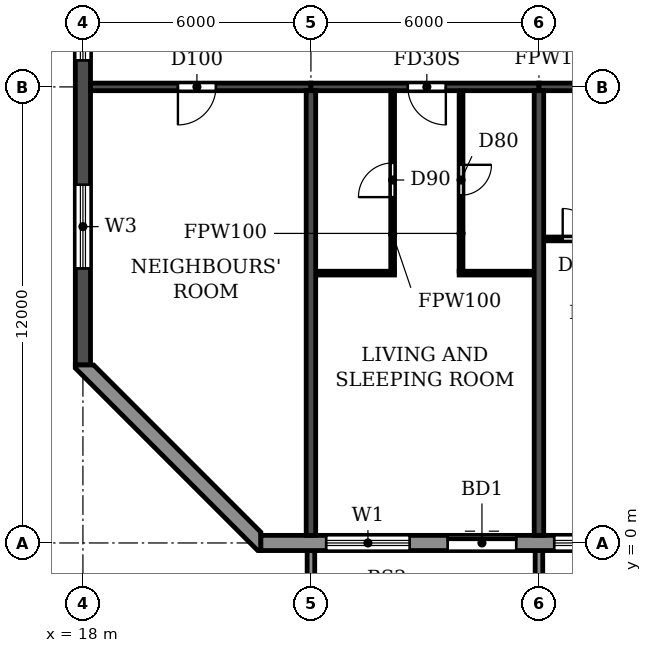
"""IFC4 building model, lengths in metres.
Left out: names, types, materials, properties, quantities, classifications, styles, units other than length and angle.
Written with IfcOpenShell. Run it as: python <this file> out.ifc"""

import sys

from ifc_helpers import new_model, si_unit, direction, frame, frame_2d, origin, place, context, subcontext, project, spatial, polyline, rectangle, outline, extrude, source, transform, mapped, element, fill, save


model = new_model("IFC4")
c1 = context("Model", 3, precision=1e-05, world=origin(), true_north=direction((0.0, 1.0)))
c2 = subcontext(c1, "Body", "Model", "MODEL_VIEW")
j1 = project(units=[si_unit("LENGTHUNIT", "METRE"), si_unit("PLANEANGLEUNIT", "RADIAN")], contexts=[c1])
p1 = place(None, origin())
s1 = spatial("IfcSite", under=j1, at=p1, CompositionType="ELEMENT")
p2 = place(p1, origin())
s2 = spatial("IfcBuilding", under=s1, at=p2, CompositionType="ELEMENT")
p3 = place(p2, frame((0.0, 0.0, 175.2)))
s3 = spatial("IfcBuildingStorey", under=s2, at=p3, CompositionType="ELEMENT", Elevation=175.2)
for number, where, z_axis, x_axis in (
    (1, (24.0, 0.2, 0.0), (0.0, 0.0, 1.0), (0.0, 1.0, 0.0)),
    (2, (30.0, 0.2, 0.0), (0.0, 0.0, 1.0), (0.0, 1.0, 0.0)),
):
    element("IfcWall", number, at=place(p3, frame(where, z_axis=z_axis, x_axis=x_axis)), inside=s3, PredefinedType="SHEAR", context=c2, shape_type="SweptSolid", body=[
        extrude(rectangle(XDim=11.7, YDim=0.25, at=frame_2d((5.85, 0.0))), origin(), (0.0, 0.0, 1.0), 3.08),
    ])
p4 = place(p3, frame((18.0, 4.683, 0.0), z_axis=(0.0, 0.0, 1.0), x_axis=(0.0, 1.0, 0.0)))
e3 = element("IfcWall", 3, at=p4, inside=s3, PredefinedType="SHEAR", context=c2, shape_type="SweptSolid", body=[
    extrude(rectangle(XDim=31.834, YDim=0.4, at=frame_2d((15.917, 0.0))), origin(), (0.0, 0.0, 1.0), 3.08),
])
p5 = place(p4, frame((23.817, 0.0, 0.9)))
e4 = element("IfcOpeningElement", 4, at=p5, cuts=e3, PredefinedType="OPENING", context=c2, shape_type="SweptSolid", body=[
    extrude(rectangle(XDim=1.2, YDim=1.5, at=frame_2d((0.6, 0.75))), frame((0.0, 0.21, 0.0), z_axis=(0.0, -1.0, 0.0), x_axis=(1.0, 0.0, 0.0)), (0.0, 0.0, 1.0), 0.42),
])
p6 = place(p4, frame((8.017, 0.0, 0.9)))
e5 = element("IfcOpeningElement", 5, at=p6, cuts=e3, PredefinedType="OPENING", context=c2, shape_type="SweptSolid", body=[
    extrude(rectangle(XDim=1.2, YDim=1.5, at=frame_2d((0.6, 0.75))), frame((0.0, 0.21, 0.0), z_axis=(0.0, -1.0, 0.0), x_axis=(1.0, 0.0, 0.0)), (0.0, 0.0, 1.0), 0.42),
])
p7 = place(p4, frame((27.694, 0.0, 0.6)))
e6 = element("IfcOpeningElement", 6, at=p7, cuts=e3, PredefinedType="OPENING", context=c2, shape_type="SweptSolid", body=[
    extrude(rectangle(XDim=2.2, YDim=1.8, at=frame_2d((1.1, 0.9))), frame((0.0, 0.21, 0.0), z_axis=(0.0, -1.0, 0.0), x_axis=(1.0, 0.0, 0.0)), (0.0, 0.0, 1.0), 0.42),
])
p8 = place(p4, frame((2.541, 0.0, 0.6)))
e7 = element("IfcOpeningElement", 7, at=p8, cuts=e3, PredefinedType="OPENING", context=c2, shape_type="SweptSolid", body=[
    extrude(rectangle(XDim=2.2, YDim=1.8, at=frame_2d((1.1, 0.9))), frame((0.0, 0.21, 0.0), z_axis=(0.0, -1.0, 0.0), x_axis=(1.0, 0.0, 0.0)), (0.0, 0.0, 1.0), 0.42),
])
p9 = place(p4, frame((15.917, 0.0, 0.9)))
e8 = element("IfcOpeningElement", 8, at=p9, cuts=e3, PredefinedType="OPENING", context=c2, shape_type="SweptSolid", body=[
    extrude(rectangle(XDim=1.2, YDim=1.5, at=frame_2d((0.6, 0.75))), frame((0.0, 0.21, 0.0), z_axis=(0.0, -1.0, 0.0), x_axis=(1.0, 0.0, 0.0)), (0.0, 0.0, 1.0), 0.42),
])
p10 = place(p3, frame((18.2, 12.0, 0.0), z_axis=(0.0, 0.0, 1.0), x_axis=(1.0, 0.0, 0.0)))
e9 = element("IfcWall", 9, at=p10, inside=s3, PredefinedType="SHEAR", context=c2, shape_type="SweptSolid", body=[
    extrude(rectangle(XDim=5.8, YDim=0.2, at=frame_2d((2.9, 0.0))), origin(), (0.0, 0.0, 1.0), 2.48),
])
p11 = place(p10, frame((2.3, 0.0, 0.0)))
e10 = element("IfcOpeningElement", 10, at=p11, cuts=e9, PredefinedType="OPENING", context=c2, shape_type="SweptSolid", body=[
    extrude(rectangle(XDim=1.0, YDim=2.1, at=frame_2d((0.5, 1.05))), frame((0.0, 0.11, 0.0), z_axis=(0.0, -1.0, 0.0), x_axis=(1.0, 0.0, 0.0)), (0.0, 0.0, 1.0), 0.22),
])
p12 = place(p3, frame((24.0, 12.0, 0.0), z_axis=(0.0, 0.0, 1.0), x_axis=(1.0, 0.0, 0.0)))
e11 = element("IfcWall", 11, at=p12, inside=s3, PredefinedType="SHEAR", context=c2, shape_type="SweptSolid", body=[
    extrude(rectangle(XDim=6.0, YDim=0.2, at=frame_2d((3.0, 0.0))), origin(), (0.0, 0.0, 1.0), 2.48),
])
p13 = place(p12, frame((2.55, 0.0, 0.0)))
e12 = element("IfcOpeningElement", 12, at=p13, cuts=e11, PredefinedType="OPENING", context=c2, shape_type="SweptSolid", body=[
    extrude(rectangle(XDim=1.0, YDim=2.1, at=frame_2d((0.5, 1.05))), frame((0.0, 0.11, 0.0), z_axis=(0.0, -1.0, 0.0), x_axis=(1.0, 0.0, 0.0)), (0.0, 0.0, 1.0), 0.22),
])
p14 = place(p3, frame((30.0, 12.0, 0.0), z_axis=(0.0, 0.0, 1.0), x_axis=(1.0, 0.0, 0.0)))
e13 = element("IfcWall", 13, at=p14, inside=s3, PredefinedType="SHEAR", context=c2, shape_type="SweptSolid", body=[
    extrude(rectangle(XDim=6.0, YDim=0.2, at=frame_2d((3.0, 0.0))), origin(), (0.0, 0.0, 1.0), 2.48),
])
p15 = place(p14, frame((2.45, 0.0, 0.0)))
e14 = element("IfcOpeningElement", 14, at=p15, cuts=e13, PredefinedType="OPENING", context=c2, shape_type="SweptSolid", body=[
    extrude(rectangle(XDim=1.0, YDim=2.1, at=frame_2d((0.5, 1.05))), frame((0.0, 0.11, 0.0), z_axis=(0.0, -1.0, 0.0), x_axis=(1.0, 0.0, 0.0)), (0.0, 0.0, 1.0), 0.22),
])
p16 = place(p3, frame((22.683, 0.0, 0.0), z_axis=(0.0, 0.0, 1.0), x_axis=(1.0, 0.0, 0.0)))
e15 = element("IfcWall", 15, at=p16, inside=s3, PredefinedType="STANDARD", context=c2, shape_type="SweptSolid", body=[
    extrude(rectangle(XDim=56.634, YDim=0.4, at=frame_2d((28.317, 0.0))), origin(), (0.0, 0.0, 1.0), 3.08),
])
p17 = place(p16, frame((1.717, 0.0, 0.9)))
e16 = element("IfcOpeningElement", 16, at=p17, cuts=e15, PredefinedType="OPENING", context=c2, shape_type="SweptSolid", body=[
    extrude(rectangle(XDim=2.2, YDim=1.5, at=frame_2d((1.1, 0.75))), frame((0.0, 0.21, 0.0), z_axis=(0.0, -1.0, 0.0), x_axis=(1.0, 0.0, 0.0)), (0.0, 0.0, 1.0), 0.42),
])
p18 = place(p16, frame((4.917, 0.0, 0.0)))
e17 = element("IfcOpeningElement", 17, at=p18, cuts=e15, PredefinedType="OPENING", context=c2, shape_type="SweptSolid", body=[
    extrude(rectangle(XDim=1.8, YDim=2.4, at=frame_2d((0.9, 1.2))), frame((0.0, 0.21, 0.0), z_axis=(0.0, -1.0, 0.0), x_axis=(1.0, 0.0, 0.0)), (0.0, 0.0, 1.0), 0.42),
])
p19 = place(p16, frame((7.717, 0.0, 0.9)))
e18 = element("IfcOpeningElement", 18, at=p19, cuts=e15, PredefinedType="OPENING", context=c2, shape_type="SweptSolid", body=[
    extrude(rectangle(XDim=2.2, YDim=1.5, at=frame_2d((1.1, 0.75))), frame((0.0, 0.21, 0.0), z_axis=(0.0, -1.0, 0.0), x_axis=(1.0, 0.0, 0.0)), (0.0, 0.0, 1.0), 0.42),
])
p20 = place(p16, frame((10.717, 0.0, 0.9)))
e19 = element("IfcOpeningElement", 19, at=p20, cuts=e15, PredefinedType="OPENING", context=c2, shape_type="SweptSolid", body=[
    extrude(rectangle(XDim=2.2, YDim=1.5, at=frame_2d((1.1, 0.75))), frame((0.0, 0.21, 0.0), z_axis=(0.0, -1.0, 0.0), x_axis=(1.0, 0.0, 0.0)), (0.0, 0.0, 1.0), 0.42),
])
p21 = place(p16, frame((13.717, 0.0, 0.9)))
e20 = element("IfcOpeningElement", 20, at=p21, cuts=e15, PredefinedType="OPENING", context=c2, shape_type="SweptSolid", body=[
    extrude(rectangle(XDim=2.2, YDim=1.5, at=frame_2d((1.1, 0.75))), frame((0.0, 0.21, 0.0), z_axis=(0.0, -1.0, 0.0), x_axis=(1.0, 0.0, 0.0)), (0.0, 0.0, 1.0), 0.42),
])
p22 = place(p16, frame((16.917, 0.0, 0.0)))
e21 = element("IfcOpeningElement", 21, at=p22, cuts=e15, PredefinedType="OPENING", context=c2, shape_type="SweptSolid", body=[
    extrude(rectangle(XDim=1.8, YDim=2.4, at=frame_2d((0.9, 1.2))), frame((0.0, 0.21, 0.0), z_axis=(0.0, -1.0, 0.0), x_axis=(1.0, 0.0, 0.0)), (0.0, 0.0, 1.0), 0.42),
])
p23 = place(p16, frame((19.717, 0.0, 0.9)))
e22 = element("IfcOpeningElement", 22, at=p23, cuts=e15, PredefinedType="OPENING", context=c2, shape_type="SweptSolid", body=[
    extrude(rectangle(XDim=2.2, YDim=1.5, at=frame_2d((1.1, 0.75))), frame((0.0, 0.21, 0.0), z_axis=(0.0, -1.0, 0.0), x_axis=(1.0, 0.0, 0.0)), (0.0, 0.0, 1.0), 0.42),
])
p24 = place(p16, frame((22.717, 0.0, 0.9)))
e23 = element("IfcOpeningElement", 23, at=p24, cuts=e15, PredefinedType="OPENING", context=c2, shape_type="SweptSolid", body=[
    extrude(rectangle(XDim=2.2, YDim=1.5, at=frame_2d((1.1, 0.75))), frame((0.0, 0.21, 0.0), z_axis=(0.0, -1.0, 0.0), x_axis=(1.0, 0.0, 0.0)), (0.0, 0.0, 1.0), 0.42),
])
p25 = place(p16, frame((25.917, 0.0, 0.0)))
e24 = element("IfcOpeningElement", 24, at=p25, cuts=e15, PredefinedType="OPENING", context=c2, shape_type="SweptSolid", body=[
    extrude(rectangle(XDim=1.8, YDim=2.4, at=frame_2d((0.9, 1.2))), frame((0.0, 0.21, 0.0), z_axis=(0.0, -1.0, 0.0), x_axis=(1.0, 0.0, 0.0)), (0.0, 0.0, 1.0), 0.42),
])
p26 = place(p16, frame((28.717, 0.0, 0.9)))
e25 = element("IfcOpeningElement", 25, at=p26, cuts=e15, PredefinedType="OPENING", context=c2, shape_type="SweptSolid", body=[
    extrude(rectangle(XDim=2.2, YDim=1.5, at=frame_2d((1.1, 0.75))), frame((0.0, 0.21, 0.0), z_axis=(0.0, -1.0, 0.0), x_axis=(1.0, 0.0, 0.0)), (0.0, 0.0, 1.0), 0.42),
])
p27 = place(p16, frame((31.717, 0.0, 0.9)))
e26 = element("IfcOpeningElement", 26, at=p27, cuts=e15, PredefinedType="OPENING", context=c2, shape_type="SweptSolid", body=[
    extrude(rectangle(XDim=2.2, YDim=1.5, at=frame_2d((1.1, 0.75))), frame((0.0, 0.21, 0.0), z_axis=(0.0, -1.0, 0.0), x_axis=(1.0, 0.0, 0.0)), (0.0, 0.0, 1.0), 0.42),
])
p28 = place(p16, frame((34.717, 0.0, 0.9)))
e27 = element("IfcOpeningElement", 27, at=p28, cuts=e15, PredefinedType="OPENING", context=c2, shape_type="SweptSolid", body=[
    extrude(rectangle(XDim=2.2, YDim=1.5, at=frame_2d((1.1, 0.75))), frame((0.0, 0.21, 0.0), z_axis=(0.0, -1.0, 0.0), x_axis=(1.0, 0.0, 0.0)), (0.0, 0.0, 1.0), 0.42),
])
p29 = place(p16, frame((37.717, 0.0, 0.9)))
e28 = element("IfcOpeningElement", 28, at=p29, cuts=e15, PredefinedType="OPENING", context=c2, shape_type="SweptSolid", body=[
    extrude(rectangle(XDim=2.2, YDim=1.5, at=frame_2d((1.1, 0.75))), frame((0.0, 0.21, 0.0), z_axis=(0.0, -1.0, 0.0), x_axis=(1.0, 0.0, 0.0)), (0.0, 0.0, 1.0), 0.42),
])
p30 = place(p16, frame((40.917, 0.0, 0.0)))
e29 = element("IfcOpeningElement", 29, at=p30, cuts=e15, PredefinedType="OPENING", context=c2, shape_type="SweptSolid", body=[
    extrude(rectangle(XDim=1.8, YDim=2.4, at=frame_2d((0.9, 1.2))), frame((0.0, 0.21, 0.0), z_axis=(0.0, -1.0, 0.0), x_axis=(1.0, 0.0, 0.0)), (0.0, 0.0, 1.0), 0.42),
])
p31 = place(p16, frame((43.717, 0.0, 0.9)))
e30 = element("IfcOpeningElement", 30, at=p31, cuts=e15, PredefinedType="OPENING", context=c2, shape_type="SweptSolid", body=[
    extrude(rectangle(XDim=2.2, YDim=1.5, at=frame_2d((1.1, 0.75))), frame((0.0, 0.21, 0.0), z_axis=(0.0, -1.0, 0.0), x_axis=(1.0, 0.0, 0.0)), (0.0, 0.0, 1.0), 0.42),
])
p32 = place(p16, frame((46.717, 0.0, 0.9)))
e31 = element("IfcOpeningElement", 31, at=p32, cuts=e15, PredefinedType="OPENING", context=c2, shape_type="SweptSolid", body=[
    extrude(rectangle(XDim=2.2, YDim=1.5, at=frame_2d((1.1, 0.75))), frame((0.0, 0.21, 0.0), z_axis=(0.0, -1.0, 0.0), x_axis=(1.0, 0.0, 0.0)), (0.0, 0.0, 1.0), 0.42),
])
p33 = place(p16, frame((49.717, 0.0, 0.9)))
e32 = element("IfcOpeningElement", 32, at=p33, cuts=e15, PredefinedType="OPENING", context=c2, shape_type="SweptSolid", body=[
    extrude(rectangle(XDim=2.2, YDim=1.5, at=frame_2d((1.1, 0.75))), frame((0.0, 0.21, 0.0), z_axis=(0.0, -1.0, 0.0), x_axis=(1.0, 0.0, 0.0)), (0.0, 0.0, 1.0), 0.42),
])
p34 = place(p16, frame((52.917, 0.0, 0.0)))
e33 = element("IfcOpeningElement", 33, at=p34, cuts=e15, PredefinedType="OPENING", context=c2, shape_type="SweptSolid", body=[
    extrude(rectangle(XDim=1.8, YDim=2.4, at=frame_2d((0.9, 1.2))), frame((0.0, 0.21, 0.0), z_axis=(0.0, -1.0, 0.0), x_axis=(1.0, 0.0, 0.0)), (0.0, 0.0, 1.0), 0.42),
])
p35 = place(p3, origin())
e34 = element("IfcWall", 34, at=p35, inside=s3, PredefinedType="STANDARD", context=c2, shape_type="SweptSolid", body=[
    extrude(outline(polyline([(17.8, 4.683), (17.8, 4.6), (22.6, -0.2), (22.683, -0.2), (22.683, 0.283), (18.283, 4.683), (17.8, 4.683)])), origin(), (0.0, 0.0, 1.0), 3.08),
])
m1 = source(origin(), c2, "Body", "SweptSolid", [
    extrude(outline(polyline([(0.0, 0.0), (0.2, 0.0), (0.2, 1.65), (0.0, 1.65), (0.0, 0.0)])), origin(), (0.0, 0.0, 1.0), 3.1),
])
for number, where in (
    (35, (23.9, -1.85, 0.0)),
    (36, (29.9, -1.85, 0.0)),
):
    element("IfcWall", number, at=place(p3, frame(where)), inside=s3, PredefinedType="STANDARD", context=c2, shape_type="MappedRepresentation", body=[
        mapped(m1, transform((0.0, 0.0, 0.0))),
    ])
p36 = place(p3, frame((24.135, 7.1, 0.0), z_axis=(0.0, 0.0, 1.0), x_axis=(1.0, 0.0, 0.0)))
e37 = element("IfcWall", 37, at=p36, inside=s3, PredefinedType="PARTITIONING", context=c2, shape_type="SweptSolid", body=[
    extrude(rectangle(XDim=2.065, YDim=0.1, at=frame_2d((1.032, 0.0))), origin(), (0.0, 0.0, 1.0), 3.08),
])
p37 = place(p3, frame((27.9, 7.1, 0.0), z_axis=(0.0, 0.0, 1.0), x_axis=(1.0, 0.0, 0.0)))
e38 = element("IfcWall", 38, at=p37, inside=s3, PredefinedType="PARTITIONING", context=c2, shape_type="SweptSolid", body=[
    extrude(rectangle(XDim=1.965, YDim=0.1, at=frame_2d((0.982, 0.0))), origin(), (0.0, 0.0, 1.0), 3.08),
])
p38 = place(p3, frame((30.135, 8.0, 0.0), z_axis=(0.0, 0.0, 1.0), x_axis=(1.0, 0.0, 0.0)))
e39 = element("IfcWall", 39, at=p38, inside=s3, PredefinedType="PARTITIONING", context=c2, shape_type="SweptSolid", body=[
    extrude(rectangle(XDim=1.965, YDim=0.1, at=frame_2d((0.982, 0.0))), origin(), (0.0, 0.0, 1.0), 3.08),
])
p39 = place(p38, frame((0.49, 0.0, 0.0)))
e40 = element("IfcOpeningElement", 40, at=p39, cuts=e39, PredefinedType="OPENING", context=c2, shape_type="SweptSolid", body=[
    extrude(rectangle(XDim=0.8, YDim=2.1, at=frame_2d((0.4, 1.05))), frame((0.0, 0.06, 0.0), z_axis=(0.0, -1.0, 0.0), x_axis=(1.0, 0.0, 0.0)), (0.0, 0.0, 1.0), 0.12),
])
p40 = place(p3, frame((26.15, 7.15, 0.0), z_axis=(0.0, 0.0, 1.0), x_axis=(0.0, 1.0, 0.0)))
e41 = element("IfcWall", 41, at=p40, inside=s3, PredefinedType="PARTITIONING", context=c2, shape_type="SweptSolid", body=[
    extrude(rectangle(XDim=4.74, YDim=0.1, at=frame_2d((2.37, 0.0))), origin(), (0.0, 0.0, 1.0), 3.08),
])
p41 = place(p40, frame((1.95, 0.0, 0.0)))
e42 = element("IfcOpeningElement", 42, at=p41, cuts=e41, PredefinedType="OPENING", context=c2, shape_type="SweptSolid", body=[
    extrude(rectangle(XDim=0.9, YDim=2.1, at=frame_2d((0.45, 1.05))), frame((0.0, 0.06, 0.0), z_axis=(0.0, -1.0, 0.0), x_axis=(1.0, 0.0, 0.0)), (0.0, 0.0, 1.0), 0.12),
])
p42 = place(p3, frame((27.95, 7.15, 0.0), z_axis=(0.0, 0.0, 1.0), x_axis=(0.0, 1.0, 0.0)))
e43 = element("IfcWall", 43, at=p42, inside=s3, PredefinedType="PARTITIONING", context=c2, shape_type="SweptSolid", body=[
    extrude(rectangle(XDim=4.74, YDim=0.1, at=frame_2d((2.37, 0.0))), origin(), (0.0, 0.0, 1.0), 3.08),
])
p43 = place(p42, frame((2.0, 0.0, 0.0)))
e44 = element("IfcOpeningElement", 44, at=p43, cuts=e43, PredefinedType="OPENING", context=c2, shape_type="SweptSolid", body=[
    extrude(rectangle(XDim=0.8, YDim=2.1, at=frame_2d((0.4, 1.05))), frame((0.0, 0.06, 0.0), z_axis=(0.0, -1.0, 0.0), x_axis=(1.0, 0.0, 0.0)), (0.0, 0.0, 1.0), 0.12),
])
p44 = place(p17, origin())
e45 = element("IfcWindow", 45, at=p44, inside=s3, PartitioningType="DOUBLE_PANEL_HORIZONTAL", PredefinedType="WINDOW", context=c2, shape_type="SweptSolid", body=[
    extrude(rectangle(XDim=2.2, YDim=1.5, at=frame_2d((1.1, 0.75))), frame((0.0, 0.03, 0.0), z_axis=(0.0, -1.0, 0.0), x_axis=(1.0, 0.0, 0.0)), (0.0, 0.0, 1.0), 0.06),
])
fill(e16, e45)
p45 = place(p18, origin())
e46 = element("IfcDoor", 46, at=p45, inside=s3, OperationType="DOUBLE_DOOR_SLIDING", PredefinedType="DOOR", context=c2, shape_type="SweptSolid", body=[
    extrude(rectangle(XDim=1.8, YDim=2.4, at=frame_2d((0.9, 1.2))), frame((0.0, 0.025, 0.0), z_axis=(0.0, -1.0, 0.0), x_axis=(1.0, 0.0, 0.0)), (0.0, 0.0, 1.0), 0.05),
])
fill(e17, e46)
p46 = place(p19, origin())
e47 = element("IfcWindow", 47, at=p46, inside=s3, PartitioningType="DOUBLE_PANEL_HORIZONTAL", PredefinedType="WINDOW", context=c2, shape_type="SweptSolid", body=[
    extrude(rectangle(XDim=2.2, YDim=1.5, at=frame_2d((1.1, 0.75))), frame((0.0, 0.03, 0.0), z_axis=(0.0, -1.0, 0.0), x_axis=(1.0, 0.0, 0.0)), (0.0, 0.0, 1.0), 0.06),
])
fill(e18, e47)
p47 = place(p6, origin())
e48 = element("IfcWindow", 48, at=p47, inside=s3, PartitioningType="SINGLE_PANEL", PredefinedType="WINDOW", context=c2, shape_type="SweptSolid", body=[
    extrude(rectangle(XDim=1.2, YDim=1.5, at=frame_2d((0.6, 0.75))), frame((0.0, 0.03, 0.0), z_axis=(0.0, -1.0, 0.0), x_axis=(1.0, 0.0, 0.0)), (0.0, 0.0, 1.0), 0.06),
])
fill(e5, e48)
p48 = place(p8, origin())
e49 = element("IfcWindow", 49, at=p48, inside=s3, PartitioningType="DOUBLE_PANEL_HORIZONTAL", PredefinedType="WINDOW", context=c2, shape_type="SweptSolid", body=[
    extrude(rectangle(XDim=2.2, YDim=1.8, at=frame_2d((1.1, 0.9))), frame((0.0, 0.03, 0.0), z_axis=(0.0, -1.0, 0.0), x_axis=(1.0, 0.0, 0.0)), (0.0, 0.0, 1.0), 0.06),
])
fill(e7, e49)
p49 = place(p11, frame((1.0, 0.0, 0.0), z_axis=(0.0, 0.0, 1.0), x_axis=(-1.0, 0.0, 0.0)))
e50 = element("IfcDoor", 50, at=p49, inside=s3, OperationType="SINGLE_SWING_RIGHT", PredefinedType="DOOR", context=c2, shape_type="SweptSolid", body=[
    extrude(rectangle(XDim=1.0, YDim=2.1, at=frame_2d((0.5, 1.05))), frame((0.0, 0.025, 0.0), z_axis=(0.0, -1.0, 0.0), x_axis=(1.0, 0.0, 0.0)), (0.0, 0.0, 1.0), 0.05),
])
fill(e10, e50)
p50 = place(p41, origin())
e51 = element("IfcDoor", 51, at=p50, inside=s3, OperationType="SINGLE_SWING_LEFT", PredefinedType="DOOR", context=c2, shape_type="SweptSolid", body=[
    extrude(rectangle(XDim=0.9, YDim=2.1, at=frame_2d((0.45, 1.05))), frame((0.0, 0.025, 0.0), z_axis=(0.0, -1.0, 0.0), x_axis=(1.0, 0.0, 0.0)), (0.0, 0.0, 1.0), 0.05),
])
fill(e42, e51)
p51 = place(p13, frame((1.0, 0.0, 0.0), z_axis=(0.0, 0.0, 1.0), x_axis=(-1.0, 0.0, 0.0)))
e52 = element("IfcDoor", 52, at=p51, inside=s3, OperationType="SINGLE_SWING_LEFT", PredefinedType="DOOR", context=c2, shape_type="SweptSolid", body=[
    extrude(rectangle(XDim=1.0, YDim=2.1, at=frame_2d((0.5, 1.05))), frame((0.0, 0.025, 0.0), z_axis=(0.0, -1.0, 0.0), x_axis=(1.0, 0.0, 0.0)), (0.0, 0.0, 1.0), 0.05),
])
fill(e12, e52)
p52 = place(p43, frame((0.8, 0.0, 0.0), z_axis=(0.0, 0.0, 1.0), x_axis=(-1.0, 0.0, 0.0)))
e53 = element("IfcDoor", 53, at=p52, inside=s3, OperationType="SINGLE_SWING_LEFT", PredefinedType="DOOR", context=c2, shape_type="SweptSolid", body=[
    extrude(rectangle(XDim=0.8, YDim=2.1, at=frame_2d((0.4, 1.05))), frame((0.0, 0.025, 0.0), z_axis=(0.0, -1.0, 0.0), x_axis=(1.0, 0.0, 0.0)), (0.0, 0.0, 1.0), 0.05),
])
fill(e44, e53)
p53 = place(p39, origin())
e54 = element("IfcDoor", 54, at=p53, inside=s3, OperationType="SINGLE_SWING_LEFT", PredefinedType="DOOR", context=c2, shape_type="SweptSolid", body=[
    extrude(rectangle(XDim=0.8, YDim=2.1, at=frame_2d((0.4, 1.05))), frame((0.0, 0.025, 0.0), z_axis=(0.0, -1.0, 0.0), x_axis=(1.0, 0.0, 0.0)), (0.0, 0.0, 1.0), 0.05),
])
fill(e40, e54)
save(model, sys.argv[1])
